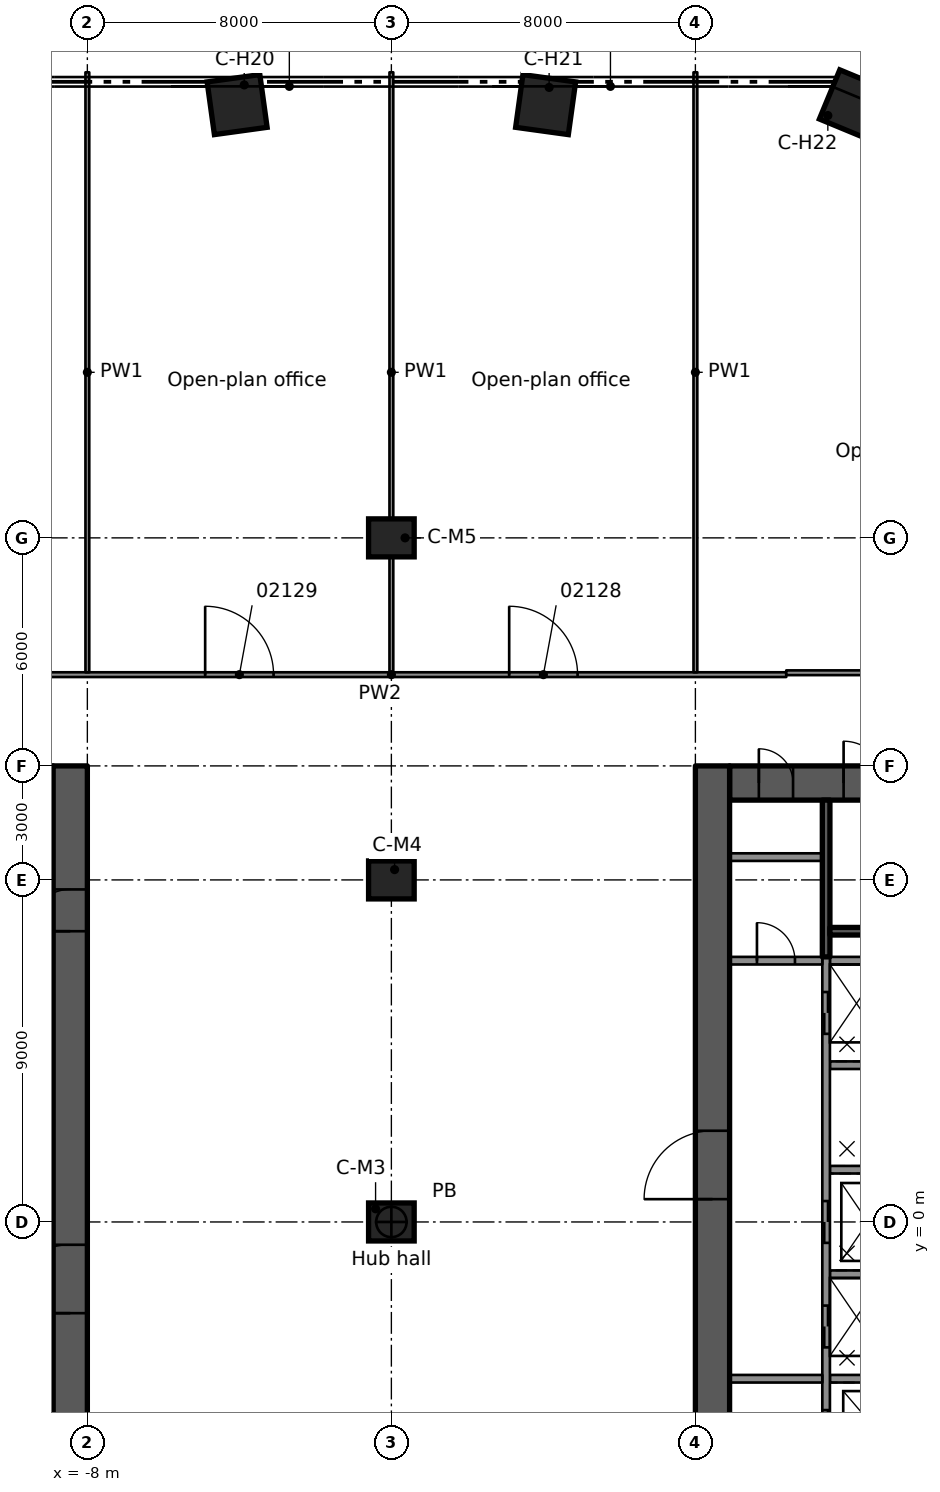
"""IFC4 building model, lengths in metres.
Left out: names, types, materials, properties, quantities, classifications, styles, units other than length and angle.
Written with IfcOpenShell. Run it as: python <this file> out.ifc"""

import sys

from ifc_helpers import new_model, si_unit, direction, frame, frame_2d, origin, origin_2d, place, context, subcontext, project, spatial, rectangle, extrude, element, fill, save


model = new_model("IFC4")
c1 = context("Model", 3, precision=1e-05, world=origin(), true_north=direction((0.0, 1.0)))
c2 = subcontext(c1, "Body", "Model", "MODEL_VIEW")
j1 = project(units=[si_unit("LENGTHUNIT", "METRE"), si_unit("PLANEANGLEUNIT", "RADIAN")], contexts=[c1])
p1 = place(None, origin())
s1 = spatial("IfcSite", under=j1, at=p1, CompositionType="ELEMENT")
p2 = place(p1, origin())
s2 = spatial("IfcBuilding", under=s1, at=p2, CompositionType="ELEMENT")
p3 = place(p2, frame((0.0, 0.0, 10.5)))
s3 = spatial("IfcBuildingStorey", under=s2, at=p3, CompositionType="ELEMENT", Elevation=10.5)
p4 = place(p3, frame((-18.1, 11.55, 0.0), z_axis=(0.0, 0.0, 1.0), x_axis=(1.0, 0.0, 0.0)))
e1 = element("IfcWall", 1, at=p4, inside=s3, PredefinedType="SHEAR", context=c2, shape_type="SweptSolid", body=[
    extrude(rectangle(XDim=9.2, YDim=0.9, at=frame_2d((4.6, 0.0))), origin(), (0.0, 0.0, 1.0), 5.0),
])
p5 = place(p4, frame((5.1, 0.0, 0.0)))
e2 = element("IfcOpeningElement", 2, at=p5, cuts=e1, PredefinedType="OPENING", context=c2, shape_type="SweptSolid", body=[
    extrude(rectangle(XDim=1.1, YDim=2.1, at=frame_2d((0.55, 1.05))), frame((0.0, 0.46, 0.0), z_axis=(0.0, -1.0, 0.0), x_axis=(1.0, 0.0, 0.0)), (0.0, 0.0, 1.0), 0.92),
])
p6 = place(p3, frame((-8.45, -12.0, 0.0), z_axis=(0.0, 0.0, 1.0), x_axis=(0.0, 1.0, 0.0)))
e3 = element("IfcWall", 3, at=p6, inside=s3, PredefinedType="SHEAR", context=c2, shape_type="SweptSolid", body=[
    extrude(rectangle(XDim=24.0, YDim=0.9, at=frame_2d((12.0, 0.0))), origin(), (0.0, 0.0, 1.0), 5.0),
])
p7 = place(p6, frame((9.6, 0.0, 0.0)))
e4 = element("IfcOpeningElement", 4, at=p7, cuts=e3, PredefinedType="OPENING", context=c2, shape_type="SweptSolid", body=[
    extrude(rectangle(XDim=1.8, YDim=2.1, at=frame_2d((0.9, 1.05))), frame((0.0, 0.46, 0.0), z_axis=(0.0, -1.0, 0.0), x_axis=(1.0, 0.0, 0.0)), (0.0, 0.0, 1.0), 0.92),
])
p8 = place(p6, frame((19.65, 0.0, 0.0)))
e5 = element("IfcOpeningElement", 5, at=p8, cuts=e3, PredefinedType="OPENING", context=c2, shape_type="SweptSolid", body=[
    extrude(rectangle(XDim=1.1, YDim=2.1, at=frame_2d((0.55, 1.05))), frame((0.0, 0.46, 0.0), z_axis=(0.0, -1.0, 0.0), x_axis=(1.0, 0.0, 0.0)), (0.0, 0.0, 1.0), 0.92),
])
p9 = place(p3, frame((8.9, 11.55, 0.0), z_axis=(0.0, 0.0, 1.0), x_axis=(1.0, 0.0, 0.0)))
e6 = element("IfcWall", 6, at=p9, inside=s3, PredefinedType="SHEAR", context=c2, shape_type="SweptSolid", body=[
    extrude(rectangle(XDim=9.2, YDim=0.9, at=frame_2d((4.6, 0.0))), origin(), (0.0, 0.0, 1.0), 5.0),
])
p10 = place(p9, frame((3.0, 0.0, 0.0)))
e7 = element("IfcOpeningElement", 7, at=p10, cuts=e6, PredefinedType="OPENING", context=c2, shape_type="SweptSolid", body=[
    extrude(rectangle(XDim=1.1, YDim=2.1, at=frame_2d((0.55, 1.05))), frame((0.0, 0.46, 0.0), z_axis=(0.0, -1.0, 0.0), x_axis=(1.0, 0.0, 0.0)), (0.0, 0.0, 1.0), 0.92),
])
p11 = place(p9, frame((0.77, 0.0, 0.0)))
e8 = element("IfcOpeningElement", 8, at=p11, cuts=e6, PredefinedType="OPENING", context=c2, shape_type="SweptSolid", body=[
    extrude(rectangle(XDim=0.9, YDim=2.1, at=frame_2d((0.45, 1.05))), frame((0.0, 0.46, 0.0), z_axis=(0.0, -1.0, 0.0), x_axis=(1.0, 0.0, 0.0)), (0.0, 0.0, 1.0), 0.92),
])
p12 = place(p3, frame((8.45, -12.0, 0.0), z_axis=(0.0, 0.0, 1.0), x_axis=(0.0, 1.0, 0.0)))
e9 = element("IfcWall", 9, at=p12, inside=s3, PredefinedType="SHEAR", context=c2, shape_type="SweptSolid", body=[
    extrude(rectangle(XDim=24.0, YDim=0.9, at=frame_2d((12.0, 0.0))), origin(), (0.0, 0.0, 1.0), 5.0),
])
p13 = place(p12, frame((12.6, 0.0, 0.0)))
e10 = element("IfcOpeningElement", 10, at=p13, cuts=e9, PredefinedType="OPENING", context=c2, shape_type="SweptSolid", body=[
    extrude(rectangle(XDim=1.8, YDim=2.1, at=frame_2d((0.9, 1.05))), frame((0.0, 0.46, 0.0), z_axis=(0.0, -1.0, 0.0), x_axis=(1.0, 0.0, 0.0)), (0.0, 0.0, 1.0), 0.92),
])
p14 = place(p12, frame((3.25, 0.0, 0.0)))
e11 = element("IfcOpeningElement", 11, at=p14, cuts=e9, PredefinedType="OPENING", context=c2, shape_type="SweptSolid", body=[
    extrude(rectangle(XDim=1.1, YDim=2.1, at=frame_2d((0.55, 1.05))), frame((0.0, 0.46, 0.0), z_axis=(0.0, -1.0, 0.0), x_axis=(1.0, 0.0, 0.0)), (0.0, 0.0, 1.0), 0.92),
])
for number, where, z_axis, x_axis in (
    (12, (-4.059, 29.4, -1.0), (0.0, 0.0, 1.0), (0.707, 0.707, 0.0)),
    (13, (4.059, 29.4, -1.0), (0.0, 0.0, 1.0), (0.707, 0.707, 0.0)),
    (14, (12.178, 29.4, -1.0), (0.0, 0.0, 1.0), (0.707, 0.707, 0.0)),
):
    element("IfcColumn", number, at=place(p3, frame(where, z_axis=z_axis, x_axis=x_axis)), inside=s3, PredefinedType="COLUMN", context=c2, shape_type="SweptSolid", body=[
        extrude(rectangle(XDim=3.4, YDim=3.4, at=origin_2d()), origin(), (0.0, 0.0, 1.0), 1.0),
    ])
for number, where, z_axis, x_axis in (
    (15, (-4.059, 29.4, 0.0), (0.0, 0.0, 1.0), (-0.137, 0.991, 0.0)),
    (16, (4.059, 29.4, 0.0), (0.0, 0.0, 1.0), (0.137, 0.991, 0.0)),
    (17, (12.178, 29.4, 0.0), (0.0, 0.0, 1.0), (0.383, 0.924, 0.0)),
):
    element("IfcColumn", number, at=place(p3, frame(where, z_axis=z_axis, x_axis=x_axis)), inside=s3, PredefinedType="COLUMN", context=c2, shape_type="SweptSolid", body=[
        extrude(rectangle(XDim=1.4, YDim=1.4, at=origin_2d()), origin(), (0.0, 0.0, 1.0), 5.0),
    ])
for number, where, z_axis, x_axis in (
    (18, (0.0, 0.0, 0.0), (0.0, 0.0, 1.0), (1.0, 0.0, 0.0)),
    (19, (0.0, 9.0, 0.0), (0.0, 0.0, 1.0), (1.0, 0.0, 0.0)),
    (20, (0.0, 18.0, 0.0), (0.0, 0.0, 1.0), (1.0, 0.0, 0.0)),
):
    element("IfcColumn", number, at=place(p3, frame(where, z_axis=z_axis, x_axis=x_axis)), inside=s3, PredefinedType="COLUMN", context=c2, shape_type="SweptSolid", body=[
        extrude(rectangle(XDim=1.2, YDim=1.0, at=origin_2d()), origin(), (0.0, 0.0, 1.0), 5.0),
    ])
p15 = place(p3, frame((-8.9, 4.125, 0.0), z_axis=(0.0, 0.0, 1.0), x_axis=(-1.0, 0.0, 0.0)))
e21 = element("IfcWall", 21, at=p15, inside=s3, PredefinedType="PARTITIONING", context=c2, shape_type="SweptSolid", body=[
    extrude(rectangle(XDim=2.44, YDim=0.2, at=frame_2d((1.22, 0.0))), origin(), (0.0, 0.0, 1.0), 4.59),
])
p16 = place(p3, frame((11.54, 6.875, 0.0), z_axis=(0.0, 0.0, 1.0), x_axis=(1.0, 0.0, 0.0)))
e22 = element("IfcWall", 22, at=p16, inside=s3, PredefinedType="SOLIDWALL", context=c2, shape_type="SweptSolid", body=[
    extrude(rectangle(XDim=6.56, YDim=0.2, at=frame_2d((3.28, 0.0))), origin(), (0.0, 0.0, 1.0), 4.59),
])
p17 = place(p3, frame((11.54, 4.125, 0.0), z_axis=(0.0, 0.0, 1.0), x_axis=(1.0, 0.0, 0.0)))
e23 = element("IfcWall", 23, at=p17, inside=s3, PredefinedType="SOLIDWALL", context=c2, shape_type="SweptSolid", body=[
    extrude(rectangle(XDim=4.7, YDim=0.2, at=frame_2d((2.35, 0.0))), origin(), (0.0, 0.0, 1.0), 4.59),
])
for number, where, z_axis, x_axis in (
    (24, (11.54, 1.375, 0.0), (0.0, 0.0, 1.0), (1.0, 0.0, 0.0)),
    (25, (11.54, -1.375, 0.0), (0.0, 0.0, 1.0), (1.0, 0.0, 0.0)),
):
    element("IfcWall", number, at=place(p3, frame(where, z_axis=z_axis, x_axis=x_axis)), inside=s3, PredefinedType="SOLIDWALL", context=c2, shape_type="SweptSolid", body=[
        extrude(rectangle(XDim=4.2, YDim=0.2, at=frame_2d((2.1, 0.0))), origin(), (0.0, 0.0, 1.0), 4.59),
    ])
p18 = place(p3, frame((11.54, -4.125, 0.0), z_axis=(0.0, 0.0, 1.0), x_axis=(1.0, 0.0, 0.0)))
e26 = element("IfcWall", 26, at=p18, inside=s3, PredefinedType="SOLIDWALL", context=c2, shape_type="SweptSolid", body=[
    extrude(rectangle(XDim=4.7, YDim=0.2, at=frame_2d((2.35, 0.0))), origin(), (0.0, 0.0, 1.0), 4.59),
])
p19 = place(p3, frame((11.44, 6.975, 0.0), z_axis=(0.0, 0.0, 1.0), x_axis=(0.0, -1.0, 0.0)))
e27 = element("IfcWall", 27, at=p19, inside=s3, PredefinedType="SOLIDWALL", context=c2, shape_type="SweptSolid", body=[
    extrude(rectangle(XDim=13.95, YDim=0.2, at=frame_2d((6.975, 0.0))), origin(), (0.0, 0.0, 1.0), 4.59),
])
p20 = place(p19, frame((0.925, 0.0, 0.0)))
e28 = element("IfcOpeningElement", 28, at=p20, cuts=e27, PredefinedType="OPENING", context=c2, shape_type="SweptSolid", body=[
    extrude(rectangle(XDim=1.1, YDim=2.1, at=frame_2d((0.55, 1.05))), frame((0.0, 0.11, 0.0), z_axis=(0.0, -1.0, 0.0), x_axis=(1.0, 0.0, 0.0)), (0.0, 0.0, 1.0), 0.22),
])
p21 = place(p19, frame((6.425, 0.0, 0.0)))
e29 = element("IfcOpeningElement", 29, at=p21, cuts=e27, PredefinedType="OPENING", context=c2, shape_type="SweptSolid", body=[
    extrude(rectangle(XDim=1.1, YDim=2.1, at=frame_2d((0.55, 1.05))), frame((0.0, 0.11, 0.0), z_axis=(0.0, -1.0, 0.0), x_axis=(1.0, 0.0, 0.0)), (0.0, 0.0, 1.0), 0.22),
])
p22 = place(p19, frame((9.175, 0.0, 0.0)))
e30 = element("IfcOpeningElement", 30, at=p22, cuts=e27, PredefinedType="OPENING", context=c2, shape_type="SweptSolid", body=[
    extrude(rectangle(XDim=1.1, YDim=2.1, at=frame_2d((0.55, 1.05))), frame((0.0, 0.11, 0.0), z_axis=(0.0, -1.0, 0.0), x_axis=(1.0, 0.0, 0.0)), (0.0, 0.0, 1.0), 0.22),
])
p23 = place(p19, frame((11.925, 0.0, 0.0)))
e31 = element("IfcOpeningElement", 31, at=p23, cuts=e27, PredefinedType="OPENING", context=c2, shape_type="SweptSolid", body=[
    extrude(rectangle(XDim=1.1, YDim=2.1, at=frame_2d((0.55, 1.05))), frame((0.0, 0.11, 0.0), z_axis=(0.0, -1.0, 0.0), x_axis=(1.0, 0.0, 0.0)), (0.0, 0.0, 1.0), 0.22),
])
p24 = place(p3, frame((11.44, 11.1, 0.0), z_axis=(0.0, 0.0, 1.0), x_axis=(0.0, -1.0, 0.0)))
e32 = element("IfcWall", 32, at=p24, inside=s3, PredefinedType="SOLIDWALL", context=c2, shape_type="SweptSolid", body=[
    extrude(rectangle(XDim=4.125, YDim=0.2, at=frame_2d((2.062, 0.0))), origin(), (0.0, 0.0, 1.0), 4.59),
])
p25 = place(p3, frame((11.54, 7.65, 0.0), z_axis=(0.0, 0.0, 1.0), x_axis=(1.0, 0.0, 0.0)))
e33 = element("IfcWall", 33, at=p25, inside=s3, PredefinedType="SOLIDWALL", context=c2, shape_type="SweptSolid", body=[
    extrude(rectangle(XDim=6.56, YDim=0.2, at=frame_2d((3.28, 0.0))), origin(), (0.0, 0.0, 1.0), 4.59),
])
p26 = place(p3, frame((8.9, -4.125, 0.0), z_axis=(0.0, 0.0, 1.0), x_axis=(1.0, 0.0, 0.0)))
e34 = element("IfcWall", 34, at=p26, inside=s3, PredefinedType="PARTITIONING", context=c2, shape_type="SweptSolid", body=[
    extrude(rectangle(XDim=2.44, YDim=0.2, at=frame_2d((1.22, 0.0))), origin(), (0.0, 0.0, 1.0), 4.59),
])
p27 = place(p3, frame((8.9, 6.875, 0.0), z_axis=(0.0, 0.0, 1.0), x_axis=(1.0, 0.0, 0.0)))
e35 = element("IfcWall", 35, at=p27, inside=s3, PredefinedType="PARTITIONING", context=c2, shape_type="SweptSolid", body=[
    extrude(rectangle(XDim=2.44, YDim=0.2, at=frame_2d((1.22, 0.0))), origin(), (0.0, 0.0, 1.0), 4.59),
])
p28 = place(p27, frame((0.72, 0.0, 0.0)))
e36 = element("IfcOpeningElement", 36, at=p28, cuts=e35, PredefinedType="OPENING", context=c2, shape_type="SweptSolid", body=[
    extrude(rectangle(XDim=1.0, YDim=2.1, at=frame_2d((0.5, 1.05))), frame((0.0, 0.11, 0.0), z_axis=(0.0, -1.0, 0.0), x_axis=(1.0, 0.0, 0.0)), (0.0, 0.0, 1.0), 0.22),
])
p29 = place(p3, frame((8.9, 9.6, 0.0), z_axis=(0.0, 0.0, 1.0), x_axis=(1.0, 0.0, 0.0)))
e37 = element("IfcWall", 37, at=p29, inside=s3, PredefinedType="PARTITIONING", context=c2, shape_type="SweptSolid", body=[
    extrude(rectangle(XDim=2.44, YDim=0.2, at=frame_2d((1.22, 0.0))), origin(), (0.0, 0.0, 1.0), 4.59),
])
p30 = place(p3, frame((-10.39, 14.401, 0.0), z_axis=(0.0, 0.0, 1.0), x_axis=(1.0, 0.0, 0.0)))
e38 = element("IfcWall", 38, at=p30, inside=s3, PredefinedType="PARTITIONING", context=c2, shape_type="SweptSolid", body=[
    extrude(rectangle(XDim=20.781, YDim=0.125, at=frame_2d((10.391, 0.0))), origin(), (0.0, 0.0, 1.0), 4.58),
])
p31 = place(p30, frame((13.49, 0.0, 0.0)))
e39 = element("IfcOpeningElement", 39, at=p31, cuts=e38, PredefinedType="OPENING", context=c2, shape_type="SweptSolid", body=[
    extrude(rectangle(XDim=1.8, YDim=2.1, at=frame_2d((0.9, 1.05))), frame((0.0, 0.073, 0.0), z_axis=(0.0, -1.0, 0.0), x_axis=(1.0, 0.0, 0.0)), (0.0, 0.0, 1.0), 0.145),
])
p32 = place(p30, frame((5.49, 0.0, 0.0)))
e40 = element("IfcOpeningElement", 40, at=p32, cuts=e38, PredefinedType="OPENING", context=c2, shape_type="SweptSolid", body=[
    extrude(rectangle(XDim=1.8, YDim=2.1, at=frame_2d((0.9, 1.05))), frame((0.0, 0.073, 0.0), z_axis=(0.0, -1.0, 0.0), x_axis=(1.0, 0.0, 0.0)), (0.0, 0.0, 1.0), 0.145),
])
p33 = place(p3, frame((10.391, 14.451, 0.0), z_axis=(0.0, 0.0, 1.0), x_axis=(1.0, 0.0, 0.0)))
e41 = element("IfcWall", 41, at=p33, inside=s3, PredefinedType="PARTITIONING", context=c2, shape_type="SweptSolid", body=[
    extrude(rectangle(XDim=10.996, YDim=0.125, at=frame_2d((5.498, 0.0))), origin(), (0.0, 0.0, 1.0), 4.58),
])
p34 = place(p33, frame((4.6, 0.0, 0.0)))
e42 = element("IfcOpeningElement", 42, at=p34, cuts=e41, PredefinedType="OPENING", context=c2, shape_type="SweptSolid", body=[
    extrude(rectangle(XDim=1.8, YDim=2.1, at=frame_2d((0.9, 1.05))), frame((0.0, 0.073, 0.0), z_axis=(0.0, -1.0, 0.0), x_axis=(1.0, 0.0, 0.0)), (0.0, 0.0, 1.0), 0.145),
])
for number, where, z_axis, x_axis in (
    (43, (8.0, 14.463, 0.0), (0.0, 0.0, 1.0), (0.0, 1.0, 0.0)),
    (44, (0.0, 14.463, 0.0), (0.0, 0.0, 1.0), (0.0, 1.0, 0.0)),
    (45, (-8.0, 14.463, 0.0), (0.0, 0.0, 1.0), (0.0, 1.0, 0.0)),
):
    element("IfcWall", number, at=place(p3, frame(where, z_axis=z_axis, x_axis=x_axis)), inside=s3, PredefinedType="PARTITIONING", context=c2, shape_type="SweptSolid", body=[
        extrude(rectangle(XDim=15.787, YDim=0.1, at=frame_2d((7.894, 0.0))), origin(), (0.0, 0.0, 1.0), 4.58),
    ])
p35 = place(p7, origin())
e46 = element("IfcDoor", 46, at=p35, inside=s3, OperationType="SINGLE_SWING_LEFT", PredefinedType="DOOR", context=c2, shape_type="SweptSolid", body=[
    extrude(rectangle(XDim=1.8, YDim=2.1, at=frame_2d((0.9, 1.05))), frame((0.0, 0.025, 0.0), z_axis=(0.0, -1.0, 0.0), x_axis=(1.0, 0.0, 0.0)), (0.0, 0.0, 1.0), 0.05),
])
fill(e4, e46)
p36 = place(p8, origin())
e47 = element("IfcDoor", 47, at=p36, inside=s3, OperationType="SINGLE_SWING_RIGHT", PredefinedType="DOOR", context=c2, shape_type="SweptSolid", body=[
    extrude(rectangle(XDim=1.1, YDim=2.1, at=frame_2d((0.55, 1.05))), frame((0.0, 0.025, 0.0), z_axis=(0.0, -1.0, 0.0), x_axis=(1.0, 0.0, 0.0)), (0.0, 0.0, 1.0), 0.05),
])
fill(e5, e47)
p37 = place(p20, origin())
e48 = element("IfcDoor", 48, at=p37, inside=s3, OperationType="DOUBLE_DOOR_SLIDING", PredefinedType="DOOR", context=c2, shape_type="SweptSolid", body=[
    extrude(rectangle(XDim=1.1, YDim=2.1, at=frame_2d((0.55, 1.05))), frame((0.0, 0.025, 0.0), z_axis=(0.0, -1.0, 0.0), x_axis=(1.0, 0.0, 0.0)), (0.0, 0.0, 1.0), 0.05),
])
fill(e28, e48)
p38 = place(p21, origin())
e49 = element("IfcDoor", 49, at=p38, inside=s3, OperationType="DOUBLE_DOOR_SLIDING", PredefinedType="DOOR", context=c2, shape_type="SweptSolid", body=[
    extrude(rectangle(XDim=1.1, YDim=2.1, at=frame_2d((0.55, 1.05))), frame((0.0, 0.025, 0.0), z_axis=(0.0, -1.0, 0.0), x_axis=(1.0, 0.0, 0.0)), (0.0, 0.0, 1.0), 0.05),
])
fill(e29, e49)
p39 = place(p22, origin())
e50 = element("IfcDoor", 50, at=p39, inside=s3, OperationType="DOUBLE_DOOR_SLIDING", PredefinedType="DOOR", context=c2, shape_type="SweptSolid", body=[
    extrude(rectangle(XDim=1.1, YDim=2.1, at=frame_2d((0.55, 1.05))), frame((0.0, 0.025, 0.0), z_axis=(0.0, -1.0, 0.0), x_axis=(1.0, 0.0, 0.0)), (0.0, 0.0, 1.0), 0.05),
])
fill(e30, e50)
p40 = place(p23, origin())
e51 = element("IfcDoor", 51, at=p40, inside=s3, OperationType="DOUBLE_DOOR_SLIDING", PredefinedType="DOOR", context=c2, shape_type="SweptSolid", body=[
    extrude(rectangle(XDim=1.1, YDim=2.1, at=frame_2d((0.55, 1.05))), frame((0.0, 0.025, 0.0), z_axis=(0.0, -1.0, 0.0), x_axis=(1.0, 0.0, 0.0)), (0.0, 0.0, 1.0), 0.05),
])
fill(e31, e51)
p41 = place(p13, origin())
e52 = element("IfcDoor", 52, at=p41, inside=s3, OperationType="SINGLE_SWING_RIGHT", PredefinedType="DOOR", context=c2, shape_type="SweptSolid", body=[
    extrude(rectangle(XDim=1.8, YDim=2.1, at=frame_2d((0.9, 1.05))), frame((0.0, 0.025, 0.0), z_axis=(0.0, -1.0, 0.0), x_axis=(1.0, 0.0, 0.0)), (0.0, 0.0, 1.0), 0.05),
])
fill(e10, e52)
p42 = place(p10, origin())
e53 = element("IfcDoor", 53, at=p42, inside=s3, OperationType="SINGLE_SWING_LEFT", PredefinedType="DOOR", context=c2, shape_type="SweptSolid", body=[
    extrude(rectangle(XDim=1.1, YDim=2.1, at=frame_2d((0.55, 1.05))), frame((0.0, 0.025, 0.0), z_axis=(0.0, -1.0, 0.0), x_axis=(1.0, 0.0, 0.0)), (0.0, 0.0, 1.0), 0.05),
])
fill(e7, e53)
p43 = place(p11, origin())
e54 = element("IfcDoor", 54, at=p43, inside=s3, OperationType="SINGLE_SWING_LEFT", PredefinedType="DOOR", context=c2, shape_type="SweptSolid", body=[
    extrude(rectangle(XDim=0.9, YDim=2.1, at=frame_2d((0.45, 1.05))), frame((0.0, 0.025, 0.0), z_axis=(0.0, -1.0, 0.0), x_axis=(1.0, 0.0, 0.0)), (0.0, 0.0, 1.0), 0.05),
])
fill(e8, e54)
p44 = place(p28, origin())
e55 = element("IfcDoor", 55, at=p44, inside=s3, OperationType="SINGLE_SWING_RIGHT", PredefinedType="DOOR", context=c2, shape_type="SweptSolid", body=[
    extrude(rectangle(XDim=1.0, YDim=2.1, at=frame_2d((0.5, 1.05))), frame((0.0, 0.025, 0.0), z_axis=(0.0, -1.0, 0.0), x_axis=(1.0, 0.0, 0.0)), (0.0, 0.0, 1.0), 0.05),
])
fill(e36, e55)
p45 = place(p31, origin())
e56 = element("IfcDoor", 56, at=p45, inside=s3, OperationType="DOUBLE_DOOR_SINGLE_SWING", PredefinedType="DOOR", context=c2, shape_type="SweptSolid", body=[
    extrude(rectangle(XDim=1.8, YDim=2.1, at=frame_2d((0.9, 1.05))), frame((0.0, 0.025, 0.0), z_axis=(0.0, -1.0, 0.0), x_axis=(1.0, 0.0, 0.0)), (0.0, 0.0, 1.0), 0.05),
])
fill(e39, e56)
p46 = place(p32, origin())
e57 = element("IfcDoor", 57, at=p46, inside=s3, OperationType="DOUBLE_DOOR_SINGLE_SWING", PredefinedType="DOOR", context=c2, shape_type="SweptSolid", body=[
    extrude(rectangle(XDim=1.8, YDim=2.1, at=frame_2d((0.9, 1.05))), frame((0.0, 0.025, 0.0), z_axis=(0.0, -1.0, 0.0), x_axis=(1.0, 0.0, 0.0)), (0.0, 0.0, 1.0), 0.05),
])
fill(e40, e57)
save(model, sys.argv[1])
